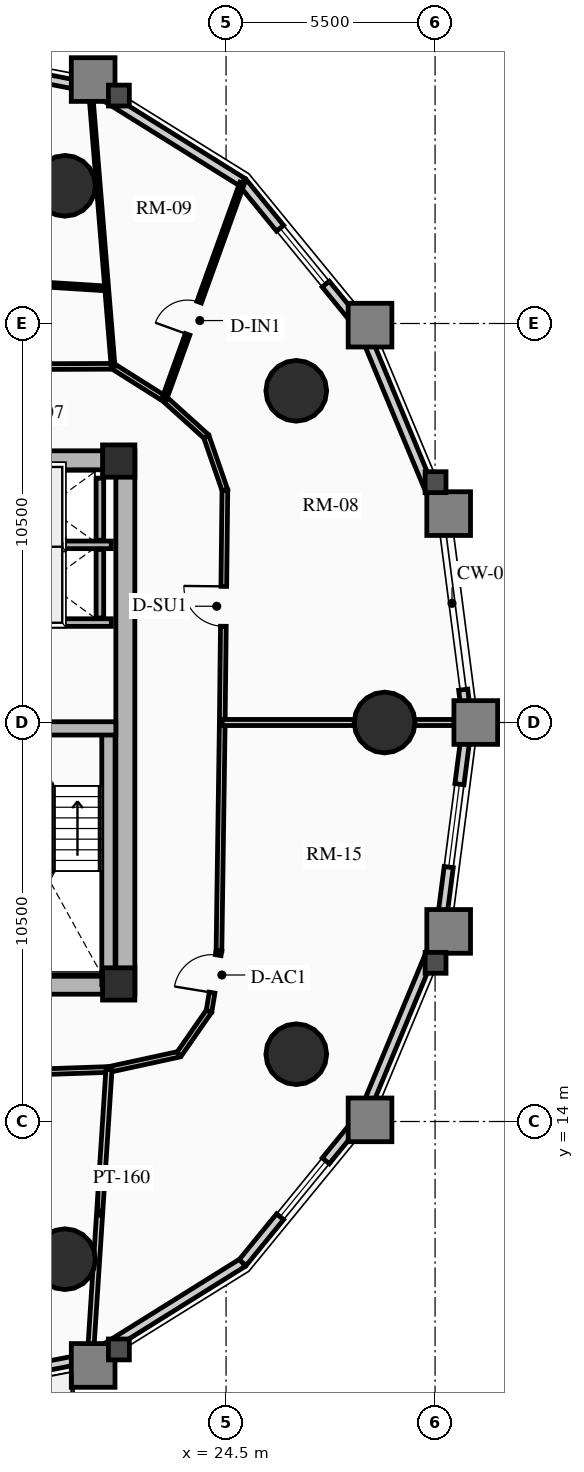
"""IFC4 building model, lengths in metres.
Left out: names, types, materials, properties, quantities, classifications, styles, units other than length and angle.
Written with IfcOpenShell. Run it as: python <this file> out.ifc"""

import sys

from ifc_helpers import new_model, si_unit, direction, frame, frame_2d, origin, origin_2d, place, context, subcontext, project, spatial, rectangle, circle, extrude, source, transform, mapped, element, fill, save


model = new_model("IFC4")
c1 = context("Model", 3, precision=1e-05, world=origin(), true_north=direction((0.0, 1.0)))
c2 = subcontext(c1, "Body", "Model", "MODEL_VIEW")
j1 = project(units=[si_unit("LENGTHUNIT", "METRE"), si_unit("PLANEANGLEUNIT", "RADIAN")], contexts=[c1])
p1 = place(None, origin())
s1 = spatial("IfcSite", under=j1, at=p1, CompositionType="ELEMENT")
p2 = place(p1, origin())
s2 = spatial("IfcBuilding", under=s1, at=p2, CompositionType="ELEMENT")
p3 = place(p2, frame((0.0, 0.0, 22.0)))
s3 = spatial("IfcBuildingStorey", under=s2, at=p3, CompositionType="ELEMENT", Elevation=22.0)
p4 = place(p3, frame((21.85, 17.35, 0.0), z_axis=(0.0, 0.0, 1.0), x_axis=(0.0, 1.0, 0.0)))
e1 = element("IfcWall", 1, at=p4, inside=s3, PredefinedType="SHEAR", context=c2, shape_type="SweptSolid", body=[
    extrude(rectangle(XDim=14.3, YDim=0.5, at=frame_2d((7.15, 0.0))), origin(), (0.0, 0.0, 1.0), 2.91),
])
p5 = place(p3, frame((11.15, 17.6, 0.0), z_axis=(0.0, 0.0, 1.0), x_axis=(1.0, 0.0, 0.0)))
e2 = element("IfcWall", 2, at=p5, inside=s3, PredefinedType="SHEAR", context=c2, shape_type="SweptSolid", body=[
    extrude(rectangle(XDim=10.7, YDim=0.5, at=frame_2d((5.35, 0.0))), origin(), (0.0, 0.0, 1.0), 2.91),
])
m1 = source(origin(), c2, "Body", "SweptSolid", [
    extrude(rectangle(XDim=1.5, YDim=2.02, at=frame_2d((0.75, 1.01))), frame((0.0, 0.26, 0.0), z_axis=(0.0, -1.0, 0.0), x_axis=(1.0, 0.0, 0.0)), (0.0, 0.0, 1.0), 0.52),
])
p6 = place(p5, frame((5.45, 0.0, 0.0)))
e3 = element("IfcOpeningElement", 3, at=p6, cuts=e2, PredefinedType="OPENING", context=c2, shape_type="MappedRepresentation", body=[
    mapped(m1, transform((0.0, 0.0, 0.0), x_axis=(1.0, 0.0, 0.0), y_axis=(0.0, 1.0, 0.0), z_axis=(0.0, 0.0, 1.0), scale=1.0)),
])
p7 = place(p3, frame((11.15, 31.4, 0.0), z_axis=(0.0, 0.0, 1.0), x_axis=(1.0, 0.0, 0.0)))
e4 = element("IfcWall", 4, at=p7, inside=s3, PredefinedType="SHEAR", context=c2, shape_type="SweptSolid", body=[
    extrude(rectangle(XDim=10.7, YDim=0.5, at=frame_2d((5.35, 0.0))), origin(), (0.0, 0.0, 1.0), 2.91),
])
p8 = place(p7, frame((4.6, 0.0, 0.0)))
e5 = element("IfcOpeningElement", 5, at=p8, cuts=e4, PredefinedType="OPENING", context=c2, shape_type="MappedRepresentation", body=[
    mapped(m1, transform((0.0, 0.0, 0.0), x_axis=(1.0, 0.0, 0.0), y_axis=(0.0, 1.0, 0.0), z_axis=(0.0, 0.0, 1.0), scale=1.0)),
])
p9 = place(p3, frame((21.405, 17.6, 0.0), z_axis=(0.0, 0.0, 1.0), x_axis=(0.0, 1.0, 0.0)))
e6 = element("IfcWall", 6, at=p9, inside=s3, PredefinedType="SHEAR", context=c2, shape_type="SweptSolid", body=[
    extrude(rectangle(XDim=6.745, YDim=0.35, at=frame_2d((3.373, 0.0))), origin(), (0.0, 0.0, 1.0), 2.91),
])
p10 = place(p3, frame((18.315, 24.345, 0.0), z_axis=(0.0, 0.0, 1.0), x_axis=(1.0, 0.0, 0.0)))
e7 = element("IfcWall", 7, at=p10, inside=s3, PredefinedType="SHEAR", context=c2, shape_type="SweptSolid", body=[
    extrude(rectangle(XDim=3.285, YDim=0.35, at=frame_2d((1.643, 0.0))), origin(), (0.0, 0.0, 1.0), 2.91),
])
for number, where, z_axis, x_axis in (
    (8, (21.675, 17.62, 0.0), (0.0, 0.0, 1.0), (1.0, 0.0, 0.0)),
    (9, (21.675, 31.38, 0.0), (0.0, 0.0, 1.0), (1.0, 0.0, 0.0)),
):
    element("IfcColumn", number, at=place(p3, frame(where, z_axis=z_axis, x_axis=x_axis)), inside=s3, PredefinedType="COLUMN", context=c2, shape_type="SweptSolid", body=[
        extrude(rectangle(XDim=0.85, YDim=0.85, at=origin_2d()), origin(), (0.0, 0.0, 1.0), 2.91),
    ])
for number, where, z_axis, x_axis in (
    (10, (28.672, 24.5, 0.0), (0.0, 0.0, 1.0), (1.0, 0.0, 0.0)),
    (11, (26.347, 33.229, 0.0), (0.0, 0.0, 1.0), (1.0, 0.0, 0.0)),
    (12, (20.261, 38.623, 0.0), (0.0, 0.0, 1.0), (1.0, 0.0, 0.0)),
    (13, (20.261, 10.377, 0.0), (0.0, 0.0, 1.0), (1.0, 0.0, 0.0)),
    (14, (26.347, 15.771, 0.0), (0.0, 0.0, 1.0), (1.0, 0.0, 0.0)),
):
    element("IfcColumn", number, at=place(p3, frame(where, z_axis=z_axis, x_axis=x_axis)), inside=s3, PredefinedType="USERDEFINED", context=c2, shape_type="SweptSolid", body=[
        extrude(circle(Radius=0.8, at=origin_2d()), origin(), (0.0, 0.0, 1.0), 2.91),
    ])
p11 = place(p3, frame((30.739, 25.363, 0.0), z_axis=(0.0, 0.0, 1.0), x_axis=(0.128523364007, -0.991706481225, 0.0)))
e15 = element("IfcWall", 15, at=p11, inside=s3, PredefinedType="SOLIDWALL", context=c2, shape_type="SweptSolid", body=[
    extrude(rectangle(XDim=0.87, YDim=0.24, at=frame_2d((0.435, 0.0))), origin(), (0.0, 0.0, 1.0), 2.635),
])
p12 = place(p3, frame((28.11, 34.827, 0.0), z_axis=(0.0, 0.0, 1.0), x_axis=(0.384255919668, -0.923226618009, 0.0)))
e16 = element("IfcWall", 16, at=p12, inside=s3, PredefinedType="SOLIDWALL", context=c2, shape_type="SweptSolid", body=[
    extrude(rectangle(XDim=5.305, YDim=0.24, at=frame_2d((2.653, 0.0))), origin(), (0.0, 0.0, 1.0), 2.073),
])
p13 = place(p3, frame((24.935, 38.714, 0.0), z_axis=(0.0, 0.0, 1.0), x_axis=(0.632588557044, -0.774488035735, 0.0)))
e17 = element("IfcWall", 17, at=p13, inside=s3, PredefinedType="SOLIDWALL", context=c2, shape_type="SweptSolid", body=[
    extrude(rectangle(XDim=5.019, YDim=0.24, at=frame_2d((2.509, 0.0))), origin(), (0.0, 0.0, 1.0), 2.073),
])
m2 = source(origin(), c2, "Body", "SweptSolid", [
    extrude(rectangle(XDim=1.9, YDim=1.35, at=frame_2d((0.95, 0.675))), frame((0.0, 0.13, 0.0), z_axis=(0.0, -1.0, 0.0), x_axis=(1.0, 0.0, 0.0)), (0.0, 0.0, 1.0), 0.26),
])
p14 = place(p13, frame((1.559, 0.0, 0.65)))
e18 = element("IfcOpeningElement", 18, at=p14, cuts=e17, PredefinedType="OPENING", context=c2, shape_type="MappedRepresentation", body=[
    mapped(m2, transform((0.0, 0.0, 0.0), x_axis=(1.0, 0.0, 0.0), y_axis=(0.0, 1.0, 0.0), z_axis=(0.0, 0.0, 1.0), scale=1.0)),
])
p15 = place(p3, frame((20.935, 41.21, 0.0), z_axis=(0.0, 0.0, 1.0), x_axis=(0.848422721916, -0.529319265601, 0.0)))
e19 = element("IfcWall", 19, at=p15, inside=s3, PredefinedType="SOLIDWALL", context=c2, shape_type="SweptSolid", body=[
    extrude(rectangle(XDim=4.715, YDim=0.24, at=frame_2d((2.357, 0.0))), origin(), (0.0, 0.0, 1.0), 2.073),
])
p16 = place(p3, frame((16.5, 42.07, 0.0), z_axis=(0.0, 0.0, 1.0), x_axis=(0.981717351035, -0.190344536766, 0.0)))
e20 = element("IfcWall", 20, at=p16, inside=s3, PredefinedType="SOLIDWALL", context=c2, shape_type="SweptSolid", body=[
    extrude(rectangle(XDim=4.517, YDim=0.24, at=frame_2d((2.259, 0.0))), origin(), (0.0, 0.0, 1.0), 2.073),
])
m3 = source(origin(), c2, "Body", "SweptSolid", [
    extrude(rectangle(XDim=2.2, YDim=1.35, at=frame_2d((1.1, 0.675))), frame((0.0, 0.13, 0.0), z_axis=(0.0, -1.0, 0.0), x_axis=(1.0, 0.0, 0.0)), (0.0, 0.0, 1.0), 0.26),
])
p17 = place(p16, frame((1.159, 0.0, 0.65)))
e21 = element("IfcOpeningElement", 21, at=p17, cuts=e20, PredefinedType="OPENING", context=c2, shape_type="MappedRepresentation", body=[
    mapped(m3, transform((0.0, 0.0, 0.0), x_axis=(1.0, 0.0, 0.0), y_axis=(0.0, 1.0, 0.0), z_axis=(0.0, 0.0, 1.0), scale=1.0)),
])
p18 = place(p3, frame((20.935, 7.79, 0.0), z_axis=(0.0, 0.0, 1.0), x_axis=(-0.981717351035, -0.190344536766, 0.0)))
e22 = element("IfcWall", 22, at=p18, inside=s3, PredefinedType="SOLIDWALL", context=c2, shape_type="SweptSolid", body=[
    extrude(rectangle(XDim=4.517, YDim=0.24, at=frame_2d((2.259, 0.0))), origin(), (0.0, 0.0, 1.0), 2.073),
])
m4 = source(origin(), c2, "Body", "SweptSolid", [
    extrude(rectangle(XDim=1.15, YDim=2.005, at=frame_2d((0.575, 1.002))), frame((0.0, 0.13, 0.0), z_axis=(0.0, -1.0, 0.0), x_axis=(1.0, 0.0, 0.0)), (0.0, 0.0, 1.0), 0.26),
])
p19 = place(p18, frame((1.684, 0.0, 0.0)))
e23 = element("IfcOpeningElement", 23, at=p19, cuts=e22, PredefinedType="OPENING", context=c2, shape_type="MappedRepresentation", body=[
    mapped(m4, transform((0.0, 0.0, 0.0), x_axis=(1.0, 0.0, 0.0), y_axis=(0.0, 1.0, 0.0), z_axis=(0.0, 0.0, 1.0), scale=1.0)),
])
p20 = place(p3, frame((24.935, 10.286, 0.0), z_axis=(0.0, 0.0, 1.0), x_axis=(-0.848422721916, -0.529319265601, 0.0)))
e24 = element("IfcWall", 24, at=p20, inside=s3, PredefinedType="SOLIDWALL", context=c2, shape_type="SweptSolid", body=[
    extrude(rectangle(XDim=4.715, YDim=0.24, at=frame_2d((2.357, 0.0))), origin(), (0.0, 0.0, 1.0), 2.073),
])
p21 = place(p3, frame((28.11, 14.173, 0.0), z_axis=(0.0, 0.0, 1.0), x_axis=(-0.632588557044, -0.774488035735, 0.0)))
e25 = element("IfcWall", 25, at=p21, inside=s3, PredefinedType="SOLIDWALL", context=c2, shape_type="SweptSolid", body=[
    extrude(rectangle(XDim=5.019, YDim=0.24, at=frame_2d((2.509, 0.0))), origin(), (0.0, 0.0, 1.0), 2.073),
])
p22 = place(p21, frame((1.559, 0.0, 0.65)))
e26 = element("IfcOpeningElement", 26, at=p22, cuts=e25, PredefinedType="OPENING", context=c2, shape_type="MappedRepresentation", body=[
    mapped(m2, transform((0.0, 0.0, 0.0), x_axis=(1.0, 0.0, 0.0), y_axis=(0.0, 1.0, 0.0), z_axis=(0.0, 0.0, 1.0), scale=1.0)),
])
p23 = place(p3, frame((30.149, 19.071, 0.0), z_axis=(0.0, 0.0, 1.0), x_axis=(-0.384255919668, -0.923226618009, 0.0)))
e27 = element("IfcWall", 27, at=p23, inside=s3, PredefinedType="SOLIDWALL", context=c2, shape_type="SweptSolid", body=[
    extrude(rectangle(XDim=5.305, YDim=0.24, at=frame_2d((2.653, 0.0))), origin(), (0.0, 0.0, 1.0), 2.073),
])
p24 = place(p3, frame((30.851, 24.5, 0.0), z_axis=(0.0, 0.0, 1.0), x_axis=(-0.128298189174, -0.991735637483, 0.0)))
e28 = element("IfcWall", 28, at=p24, inside=s3, PredefinedType="SOLIDWALL", context=c2, shape_type="SweptSolid", body=[
    extrude(rectangle(XDim=5.475, YDim=0.24, at=frame_2d((2.737, 0.0))), origin(), (0.0, 0.0, 1.0), 2.073),
])
p25 = place(p24, frame((1.637, 0.0, 0.65)))
e29 = element("IfcOpeningElement", 29, at=p25, cuts=e28, PredefinedType="OPENING", context=c2, shape_type="MappedRepresentation", body=[
    mapped(m3, transform((0.0, 0.0, 0.0), x_axis=(1.0, 0.0, 0.0), y_axis=(0.0, 1.0, 0.0), z_axis=(0.0, 0.0, 1.0), scale=1.0)),
])
for number, where, z_axis, x_axis in (
    (30, (18.51, 27.13, 0.0), (0.0, 0.0, 1.0), (1.0, 0.0, 0.0)),
    (31, (18.51, 29.175, 0.0), (0.0, 0.0, 1.0), (1.0, 0.0, 0.0)),
):
    element("IfcWall", number, at=place(p3, frame(where, z_axis=z_axis, x_axis=x_axis)), inside=s3, PredefinedType="SHEAR", context=c2, shape_type="SweptSolid", body=[
        extrude(rectangle(XDim=2.97, YDim=0.2, at=frame_2d((1.485, 0.0))), origin(), (0.0, 0.0, 1.0), 2.91),
    ])
p26 = place(p3, frame((21.18, 27.25, 0.0), z_axis=(0.0, 0.0, 1.0), x_axis=(0.0, 1.0, 0.0)))
e32 = element("IfcWall", 32, at=p26, inside=s3, PredefinedType="SHEAR", context=c2, shape_type="SweptSolid", body=[
    extrude(rectangle(XDim=1.805, YDim=0.2, at=frame_2d((0.902, 0.0))), origin(), (0.0, 0.0, 1.0), 2.91),
])
p27 = place(p3, frame((21.18, 29.295, 0.0), z_axis=(0.0, 0.0, 1.0), x_axis=(0.0, 1.0, 0.0)))
e33 = element("IfcWall", 33, at=p27, inside=s3, PredefinedType="SHEAR", context=c2, shape_type="SweptSolid", body=[
    extrude(rectangle(XDim=1.635, YDim=0.2, at=frame_2d((0.817, 0.0))), origin(), (0.0, 0.0, 1.0), 2.91),
])
p28 = place(p3, frame((24.4, 24.5, 0.0), z_axis=(0.0, 0.0, 1.0), x_axis=(0.011299841544, 0.999936154752, 0.0)))
e34 = element("IfcWall", 34, at=p28, inside=s3, PredefinedType="PARTITIONING", context=c2, shape_type="SweptSolid", body=[
    extrude(rectangle(XDim=6.115, YDim=0.15, at=frame_2d((3.057, 0.0))), origin(), (0.0, 0.0, 1.0), 2.159),
])
m5 = source(origin(), c2, "Body", "SweptSolid", [
    extrude(rectangle(XDim=1.05, YDim=2.015, at=frame_2d((0.525, 1.007))), frame((0.0, 0.085, 0.0), z_axis=(0.0, -1.0, 0.0), x_axis=(1.0, 0.0, 0.0)), (0.0, 0.0, 1.0), 0.17),
])
p29 = place(p28, frame((2.532, 0.0, 0.0)))
e35 = element("IfcOpeningElement", 35, at=p29, cuts=e34, PredefinedType="OPENING", context=c2, shape_type="MappedRepresentation", body=[
    mapped(m5, transform((0.0, 0.0, 0.0), x_axis=(1.0, 0.0, 0.0), y_axis=(0.0, 1.0, 0.0), z_axis=(0.0, 0.0, 1.0), scale=1.0)),
])
p30 = place(p3, frame((24.469, 30.614, 0.0), z_axis=(0.0, 0.0, 1.0), x_axis=(-0.327228335485, 0.944945298129, 0.0)))
e36 = element("IfcWall", 36, at=p30, inside=s3, PredefinedType="PARTITIONING", context=c2, shape_type="SweptSolid", body=[
    extrude(rectangle(XDim=1.495, YDim=0.15, at=frame_2d((0.748, 0.0))), origin(), (0.0, 0.0, 1.0), 2.205),
])
p31 = place(p3, frame((23.98, 32.027, 0.0), z_axis=(0.0, 0.0, 1.0), x_axis=(-0.742353224332, 0.670008724065, 0.0)))
e37 = element("IfcWall", 37, at=p31, inside=s3, PredefinedType="PARTITIONING", context=c2, shape_type="SweptSolid", body=[
    extrude(rectangle(XDim=1.485, YDim=0.15, at=frame_2d((0.742, 0.0))), origin(), (0.0, 0.0, 1.0), 2.159),
])
p32 = place(p3, frame((22.877, 33.022, 0.0), z_axis=(0.0, 0.0, 1.0), x_axis=(-0.845895608855, 0.533348496689, 0.0)))
e38 = element("IfcWall", 38, at=p32, inside=s3, PredefinedType="PARTITIONING", context=c2, shape_type="SweptSolid", body=[
    extrude(rectangle(XDim=1.597, YDim=0.15, at=frame_2d((0.798, 0.0))), origin(), (0.0, 0.0, 1.0), 2.205),
])
p33 = place(p3, frame((21.527, 33.873, 0.0), z_axis=(0.0, 0.0, 1.0), x_axis=(-0.999991838845, -0.004040079574, 0.0)))
e39 = element("IfcWall", 39, at=p33, inside=s3, PredefinedType="PARTITIONING", context=c2, shape_type="SweptSolid", body=[
    extrude(rectangle(XDim=3.384, YDim=0.15, at=frame_2d((1.692, 0.0))), origin(), (0.0, 0.0, 1.0), 2.159),
])
p34 = place(p3, frame((14.781, 15.141, 0.0), z_axis=(0.0, 0.0, 1.0), x_axis=(0.999407918707, 0.034406569513, 0.0)))
e40 = element("IfcWall", 40, at=p34, inside=s3, PredefinedType="PARTITIONING", context=c2, shape_type="SweptSolid", body=[
    extrude(rectangle(XDim=6.642, YDim=0.15, at=frame_2d((3.321, 0.0))), origin(), (0.0, 0.0, 1.0), 2.159),
])
p35 = place(p3, frame((21.419, 15.369, 0.0), z_axis=(0.0, 0.0, 1.0), x_axis=(0.977192701953, 0.212354475464, 0.0)))
e41 = element("IfcWall", 41, at=p35, inside=s3, PredefinedType="PARTITIONING", context=c2, shape_type="SweptSolid", body=[
    extrude(rectangle(XDim=1.888, YDim=0.15, at=frame_2d((0.944, 0.0))), origin(), (0.0, 0.0, 1.0), 2.205),
])
p36 = place(p3, frame((23.263, 15.77, 0.0), z_axis=(0.0, 0.0, 1.0), x_axis=(0.570743456919, 0.821128434768, 0.0)))
e42 = element("IfcWall", 42, at=p36, inside=s3, PredefinedType="PARTITIONING", context=c2, shape_type="SweptSolid", body=[
    extrude(rectangle(XDim=1.382, YDim=0.15, at=frame_2d((0.691, 0.0))), origin(), (0.0, 0.0, 1.0), 2.159),
])
p37 = place(p3, frame((24.052, 16.905, 0.0), z_axis=(0.0, 0.0, 1.0), x_axis=(0.162091534225, 0.986775726562, 0.0)))
e43 = element("IfcWall", 43, at=p37, inside=s3, PredefinedType="PARTITIONING", context=c2, shape_type="SweptSolid", body=[
    extrude(rectangle(XDim=1.613, YDim=0.15, at=frame_2d((0.807, 0.0))), origin(), (0.0, 0.0, 1.0), 2.205),
])
m6 = source(origin(), c2, "Body", "SweptSolid", [
    extrude(rectangle(XDim=1.0, YDim=2.015, at=frame_2d((0.5, 1.007))), frame((0.0, 0.085, 0.0), z_axis=(0.0, -1.0, 0.0), x_axis=(1.0, 0.0, 0.0)), (0.0, 0.0, 1.0), 0.17),
])
p38 = place(p37, frame((0.493, 0.0, 0.0)))
e44 = element("IfcOpeningElement", 44, at=p38, cuts=e43, PredefinedType="OPENING", context=c2, shape_type="MappedRepresentation", body=[
    mapped(m6, transform((0.0, 0.0, 0.0), x_axis=(1.0, 0.0, 0.0), y_axis=(0.0, 1.0, 0.0), z_axis=(0.0, 0.0, 1.0), scale=1.0)),
])
p39 = place(p3, frame((24.313, 18.496, 0.0), z_axis=(0.0, 0.0, 1.0), x_axis=(0.014394019188, 0.999896400739, 0.0)))
e45 = element("IfcWall", 45, at=p39, inside=s3, PredefinedType="PARTITIONING", context=c2, shape_type="SweptSolid", body=[
    extrude(rectangle(XDim=6.004, YDim=0.15, at=frame_2d((3.002, 0.0))), origin(), (0.0, 0.0, 1.0), 2.635),
])
p40 = place(p3, frame((24.4, 24.5, 0.0), z_axis=(0.0, 0.0, 1.0), x_axis=(1.0, 0.0, 0.0)))
e46 = element("IfcWall", 46, at=p40, inside=s3, PredefinedType="PARTITIONING", context=c2, shape_type="SweptSolid", body=[
    extrude(rectangle(XDim=6.431, YDim=0.16, at=frame_2d((3.216, 0.0))), origin(), (0.0, 0.0, 1.0), 2.073),
])
p41 = place(p3, frame((21.527, 33.873, 0.0), z_axis=(0.0, 0.0, 1.0), x_axis=(-0.081501553037, 0.996673214676, 0.0)))
e47 = element("IfcWall", 47, at=p41, inside=s3, PredefinedType="MOVABLE", context=c2, shape_type="SweptSolid", body=[
    extrude(rectangle(XDim=7.342, YDim=0.1, at=frame_2d((3.671, 0.0))), origin(), (0.0, 0.0, 1.0), 2.073),
])
p42 = place(p3, frame((21.419, 15.369, 0.0), z_axis=(0.0, 0.0, 1.0), x_axis=(-0.064709408161, -0.997904149954, 0.0)))
e48 = element("IfcWall", 48, at=p42, inside=s3, PredefinedType="PARTITIONING", context=c2, shape_type="SweptSolid", body=[
    extrude(rectangle(XDim=7.576, YDim=0.16, at=frame_2d((3.788, 0.0))), origin(), (0.0, 0.0, 1.0), 2.073),
])
p43 = place(p3, frame((22.877, 33.022, 0.0), z_axis=(0.0, 0.0, 1.0), x_axis=(0.339100549831, 0.94075013532, 0.0)))
e49 = element("IfcWall", 49, at=p43, inside=s3, PredefinedType="PARTITIONING", context=c2, shape_type="SweptSolid", body=[
    extrude(rectangle(XDim=6.034, YDim=0.125, at=frame_2d((3.017, 0.0))), origin(), (0.0, 0.0, 1.0), 2.073),
])
m7 = source(origin(), c2, "Body", "SweptSolid", [
    extrude(rectangle(XDim=0.9, YDim=2.005, at=frame_2d((0.45, 1.002))), frame((0.0, 0.073, 0.0), z_axis=(0.0, -1.0, 0.0), x_axis=(1.0, 0.0, 0.0)), (0.0, 0.0, 1.0), 0.145),
])
p44 = place(p43, frame((1.8, 0.0, 0.0)))
e50 = element("IfcOpeningElement", 50, at=p44, cuts=e49, PredefinedType="OPENING", context=c2, shape_type="MappedRepresentation", body=[
    mapped(m7, transform((0.0, 0.0, 0.0), x_axis=(1.0, 0.0, 0.0), y_axis=(0.0, 1.0, 0.0), z_axis=(0.0, 0.0, 1.0), scale=1.0)),
])
p45 = place(p3, frame((21.359, 35.922, 0.0), z_axis=(0.0, 0.0, 1.0), x_axis=(-0.998040956573, 0.062563959294, 0.0)))
e51 = element("IfcWall", 51, at=p45, inside=s3, PredefinedType="PARTITIONING", context=c2, shape_type="SweptSolid", body=[
    extrude(rectangle(XDim=3.684, YDim=0.125, at=frame_2d((1.842, 0.0))), origin(), (0.0, 0.0, 1.0), 2.159),
])
m8 = source(origin(), c2, "Body", "SweptSolid", [
    extrude(rectangle(XDim=1.9, YDim=1.35, at=frame_2d((0.95, 0.675))), frame((0.0, 0.03, 0.0), z_axis=(0.0, -1.0, 0.0), x_axis=(1.0, 0.0, 0.0)), (0.0, 0.0, 1.0), 0.06),
])
p46 = place(p14, origin())
e52 = element("IfcWindow", 52, at=p46, inside=s3, PartitioningType="DOUBLE_PANEL_VERTICAL", PredefinedType="WINDOW", context=c2, shape_type="MappedRepresentation", body=[
    mapped(m8, transform((0.0, 0.0, 0.0), x_axis=(1.0, 0.0, 0.0), y_axis=(0.0, 1.0, 0.0), z_axis=(0.0, 0.0, 1.0), scale=1.0)),
])
fill(e18, e52)
p47 = place(p22, origin())
e53 = element("IfcWindow", 53, at=p47, inside=s3, PartitioningType="DOUBLE_PANEL_VERTICAL", PredefinedType="WINDOW", context=c2, shape_type="MappedRepresentation", body=[
    mapped(m8, transform((0.0, 0.0, 0.0), x_axis=(1.0, 0.0, 0.0), y_axis=(0.0, 1.0, 0.0), z_axis=(0.0, 0.0, 1.0), scale=1.0)),
])
fill(e26, e53)
m9 = source(origin(), c2, "Body", "SweptSolid", [
    extrude(rectangle(XDim=2.2, YDim=1.35, at=frame_2d((1.1, 0.675))), frame((0.0, 0.03, 0.0), z_axis=(0.0, -1.0, 0.0), x_axis=(1.0, 0.0, 0.0)), (0.0, 0.0, 1.0), 0.06),
])
p48 = place(p25, origin())
e54 = element("IfcWindow", 54, at=p48, inside=s3, PartitioningType="DOUBLE_PANEL_VERTICAL", PredefinedType="WINDOW", context=c2, shape_type="MappedRepresentation", body=[
    mapped(m9, transform((0.0, 0.0, 0.0), x_axis=(1.0, 0.0, 0.0), y_axis=(0.0, 1.0, 0.0), z_axis=(0.0, 0.0, 1.0), scale=1.0)),
])
fill(e29, e54)
m10 = source(origin(), c2, "Body", "SweptSolid", [
    extrude(rectangle(XDim=1.05, YDim=2.015, at=frame_2d((0.525, 1.007))), frame((0.0, 0.025, 0.0), z_axis=(0.0, -1.0, 0.0), x_axis=(1.0, 0.0, 0.0)), (0.0, 0.0, 1.0), 0.05),
])
p49 = place(p29, origin())
e55 = element("IfcDoor", 55, at=p49, inside=s3, OperationType="SINGLE_SWING_RIGHT", PredefinedType="DOOR", context=c2, shape_type="MappedRepresentation", body=[
    mapped(m10, transform((0.0, 0.0, 0.0), x_axis=(1.0, 0.0, 0.0), y_axis=(0.0, 1.0, 0.0), z_axis=(0.0, 0.0, 1.0), scale=1.0)),
])
fill(e35, e55)
m11 = source(origin(), c2, "Body", "SweptSolid", [
    extrude(rectangle(XDim=0.9, YDim=2.005, at=frame_2d((0.45, 1.002))), frame((0.0, 0.025, 0.0), z_axis=(0.0, -1.0, 0.0), x_axis=(1.0, 0.0, 0.0)), (0.0, 0.0, 1.0), 0.05),
])
p50 = place(p44, origin())
e56 = element("IfcDoor", 56, at=p50, inside=s3, OperationType="SINGLE_SWING_LEFT", PredefinedType="DOOR", context=c2, shape_type="MappedRepresentation", body=[
    mapped(m11, transform((0.0, 0.0, 0.0), x_axis=(1.0, 0.0, 0.0), y_axis=(0.0, 1.0, 0.0), z_axis=(0.0, 0.0, 1.0), scale=1.0)),
])
fill(e50, e56)
m12 = source(origin(), c2, "Body", "SweptSolid", [
    extrude(rectangle(XDim=1.0, YDim=2.015, at=frame_2d((0.5, 1.007))), frame((0.0, 0.025, 0.0), z_axis=(0.0, -1.0, 0.0), x_axis=(1.0, 0.0, 0.0)), (0.0, 0.0, 1.0), 0.05),
])
p51 = place(p38, origin())
e57 = element("IfcDoor", 57, at=p51, inside=s3, OperationType="SINGLE_SWING_LEFT", PredefinedType="DOOR", context=c2, shape_type="MappedRepresentation", body=[
    mapped(m12, transform((0.0, 0.0, 0.0), x_axis=(1.0, 0.0, 0.0), y_axis=(0.0, 1.0, 0.0), z_axis=(0.0, 0.0, 1.0), scale=1.0)),
])
fill(e44, e57)
save(model, sys.argv[1])
